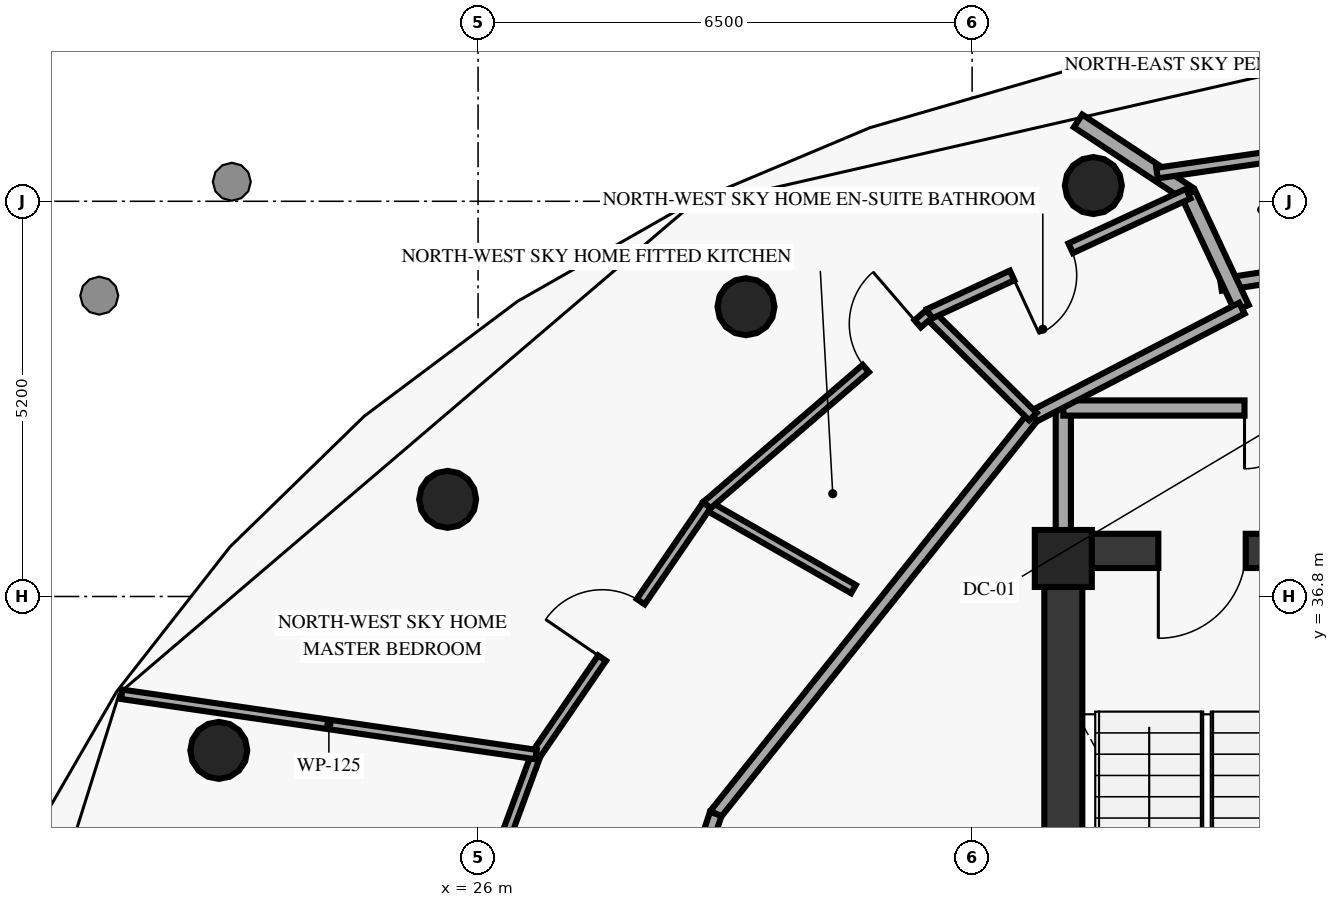
"""IFC4 building model, lengths in metres.
Left out: names, types, materials, properties, quantities, classifications, styles, units other than length and angle.
Written with IfcOpenShell. Run it as: python <this file> out.ifc"""

import sys

from ifc_helpers import new_model, si_unit, direction, frame, frame_2d, origin, origin_2d, place, context, subcontext, project, spatial, rectangle, circle, extrude, element, fill, save


model = new_model("IFC4")
c1 = context("Model", 3, precision=1e-05, world=origin(), true_north=direction((0.0, 1.0)))
c2 = subcontext(c1, "Body", "Model", "MODEL_VIEW")
j1 = project(units=[si_unit("LENGTHUNIT", "METRE"), si_unit("PLANEANGLEUNIT", "RADIAN")], contexts=[c1])
p1 = place(None, origin())
s1 = spatial("IfcSite", under=j1, at=p1, CompositionType="ELEMENT")
p2 = place(p1, origin())
s2 = spatial("IfcBuilding", under=s1, at=p2, CompositionType="ELEMENT")
p3 = place(p2, frame((0.0, 0.0, 255.6)))
s3 = spatial("IfcBuildingStorey", under=s2, at=p3, CompositionType="ELEMENT", Elevation=255.6)
p4 = place(p3, frame((33.7, 37.3, 0.0), z_axis=(0.0, 0.0, 1.0), x_axis=(1.0, 0.0, 0.0)))
e1 = element("IfcColumn", 1, at=p4, inside=s3, PredefinedType="PILASTER", context=c2, shape_type="SweptSolid", body=[
    extrude(rectangle(XDim=0.75, YDim=0.75, at=origin_2d()), origin(), (0.0, 0.0, 1.0), 3.54),
])
for number, where, z_axis, x_axis in (
    (2, (34.095, 42.207, 0.0), (0.0, 0.0, 1.0), (1.0, 0.0, 0.0)),
    (3, (29.525, 40.613, 0.0), (0.0, 0.0, 1.0), (1.0, 0.0, 0.0)),
    (4, (25.6, 38.078, 0.0), (0.0, 0.0, 1.0), (1.0, 0.0, 0.0)),
    (5, (22.589, 34.775, 0.0), (0.0, 0.0, 1.0), (1.0, 0.0, 0.0)),
):
    element("IfcColumn", number, at=place(p3, frame(where, z_axis=z_axis, x_axis=x_axis)), inside=s3, PredefinedType="COLUMN", context=c2, shape_type="SweptSolid", body=[
        extrude(circle(Radius=0.375, at=origin_2d()), origin(), (0.0, 0.0, 1.0), 3.54),
    ])
p5 = place(p3, frame((33.7, 29.05, 0.0), z_axis=(0.0, 0.0, 1.0), x_axis=(0.0, 1.0, 0.0)))
e6 = element("IfcWall", 6, at=p5, inside=s3, PredefinedType="SHEAR", context=c2, shape_type="SweptSolid", body=[
    extrude(rectangle(XDim=8.35, YDim=0.5, at=frame_2d((4.175, 0.0))), origin(), (0.0, 0.0, 1.0), 3.54),
])
p6 = place(p3, frame((37.35, 37.4, 0.0), z_axis=(0.0, 0.0, 1.0), x_axis=(-1.0, 0.0, 0.0)))
e7 = element("IfcWall", 7, at=p6, inside=s3, PredefinedType="SHEAR", context=c2, shape_type="SweptSolid", body=[
    extrude(rectangle(XDim=3.65, YDim=0.45, at=frame_2d((1.825, 0.0))), origin(), (0.0, 0.0, 1.0), 3.54),
])
p7 = place(p6, frame((1.25, 0.0, 0.0)))
e8 = element("IfcOpeningElement", 8, at=p7, cuts=e7, PredefinedType="OPENING", context=c2, shape_type="SweptSolid", body=[
    extrude(rectangle(XDim=1.15, YDim=2.15, at=frame_2d((0.575, 1.075))), frame((0.0, 0.235, 0.0), z_axis=(0.0, -1.0, 0.0), x_axis=(1.0, 0.0, 0.0)), (0.0, 0.0, 1.0), 0.47),
])
p8 = place(p3, frame((33.7, 37.4, 0.0), z_axis=(0.0, 0.0, 1.0), x_axis=(0.0, 1.0, 0.0)))
e9 = element("IfcWall", 9, at=p8, inside=s3, PredefinedType="SOLIDWALL", context=c2, shape_type="SweptSolid", body=[
    extrude(rectangle(XDim=1.88, YDim=0.2, at=frame_2d((0.94, 0.0))), origin(), (0.0, 0.0, 1.0), 3.54),
])
p9 = place(p3, frame((38.9, 39.28, 0.0), z_axis=(0.0, 0.0, 1.0), x_axis=(-1.0, 0.0, 0.0)))
e10 = element("IfcWall", 10, at=p9, inside=s3, PredefinedType="SOLIDWALL", context=c2, shape_type="SweptSolid", body=[
    extrude(rectangle(XDim=5.2, YDim=0.2, at=frame_2d((2.6, 0.0))), origin(), (0.0, 0.0, 1.0), 3.54),
])
p10 = place(p9, frame((1.216, 0.0, 0.0)))
e11 = element("IfcOpeningElement", 11, at=p10, cuts=e10, PredefinedType="OPENING", context=c2, shape_type="SweptSolid", body=[
    extrude(rectangle(XDim=1.6, YDim=2.2, at=frame_2d((0.8, 1.1))), frame((0.0, 0.11, 0.0), z_axis=(0.0, -1.0, 0.0), x_axis=(1.0, 0.0, 0.0)), (0.0, 0.0, 1.0), 0.22),
])
p11 = place(p3, frame((39.0, 41.4, 0.0), z_axis=(0.0, 0.0, 1.0), x_axis=(-0.988355267662, -0.152163940815, 0.0)))
e12 = element("IfcWall", 12, at=p11, inside=s3, PredefinedType="PARTITIONING", context=c2, shape_type="SweptSolid", body=[
    extrude(rectangle(XDim=3.265, YDim=0.16, at=frame_2d((1.633, 0.0))), origin(), (0.0, 0.0, 1.0), 3.54),
])
p12 = place(p3, frame((36.049, 40.593, 0.0), z_axis=(0.0, 0.0, 1.0), x_axis=(-0.424242188274, 0.905548764942, 0.0)))
e13 = element("IfcWall", 13, at=p12, inside=s3, PredefinedType="PARTITIONING", context=c2, shape_type="SweptSolid", body=[
    extrude(rectangle(XDim=1.664, YDim=0.2, at=frame_2d((0.832, 0.0))), origin(), (0.0, 0.0, 1.0), 3.54),
])
p13 = place(p3, frame((35.343, 42.1, 0.0), z_axis=(0.0, 0.0, 1.0), x_axis=(-0.834163281992, 0.551517559989, 0.0)))
e14 = element("IfcWall", 14, at=p13, inside=s3, PredefinedType="PARTITIONING", context=c2, shape_type="SweptSolid", body=[
    extrude(rectangle(XDim=1.737, YDim=0.2, at=frame_2d((0.869, 0.0))), origin(), (0.0, 0.0, 1.0), 3.54),
])
p14 = place(p3, frame((34.933, 42.371, 0.0), z_axis=(0.0, 0.0, 1.0), x_axis=(0.98967063222, 0.143359826038, 0.0)))
e15 = element("IfcWall", 15, at=p14, inside=s3, PredefinedType="PARTITIONING", context=c2, shape_type="SweptSolid", body=[
    extrude(rectangle(XDim=3.103, YDim=0.14, at=frame_2d((1.551, 0.0))), origin(), (0.0, 0.0, 1.0), 3.0),
])
p15 = place(p14, frame((1.762, 0.0, 0.0)))
e16 = element("IfcOpeningElement", 16, at=p15, cuts=e15, PredefinedType="OPENING", context=c2, shape_type="SweptSolid", body=[
    extrude(rectangle(XDim=0.85, YDim=2.1, at=frame_2d((0.425, 1.05))), frame((0.0, 0.08, 0.0), z_axis=(0.0, -1.0, 0.0), x_axis=(1.0, 0.0, 0.0)), (0.0, 0.0, 1.0), 0.16),
])
p16 = place(p3, frame((36.049, 40.593, 0.0), z_axis=(0.0, 0.0, 1.0), x_axis=(-0.887674575788, -0.460471331898, 0.0)))
e17 = element("IfcWall", 17, at=p16, inside=s3, PredefinedType="PARTITIONING", context=c2, shape_type="SweptSolid", body=[
    extrude(rectangle(XDim=3.097, YDim=0.16, at=frame_2d((1.548, 0.0))), origin(), (0.0, 0.0, 1.0), 3.54),
])
p17 = place(p3, frame((33.3, 39.167, 0.0), z_axis=(0.0, 0.0, 1.0), x_axis=(-0.623915746766, -0.781491612839, 0.0)))
e18 = element("IfcWall", 18, at=p17, inside=s3, PredefinedType="PARTITIONING", context=c2, shape_type="SweptSolid", body=[
    extrude(rectangle(XDim=6.688, YDim=0.16, at=frame_2d((3.344, 0.0))), origin(), (0.0, 0.0, 1.0), 3.54),
])
p18 = place(p3, frame((29.127, 33.94, 0.0), z_axis=(0.0, 0.0, 1.0), x_axis=(-0.313985571683, -0.949427754374, 0.0)))
e19 = element("IfcWall", 19, at=p18, inside=s3, PredefinedType="PARTITIONING", context=c2, shape_type="SweptSolid", body=[
    extrude(rectangle(XDim=3.627, YDim=0.16, at=frame_2d((1.813, 0.0))), origin(), (0.0, 0.0, 1.0), 3.54),
])
p19 = place(p3, frame((33.3, 39.167, 0.0), z_axis=(0.0, 0.0, 1.0), x_axis=(-0.710720381731, 0.703474618584, 0.0)))
e20 = element("IfcWall", 20, at=p19, inside=s3, PredefinedType="PARTITIONING", context=c2, shape_type="SweptSolid", body=[
    extrude(rectangle(XDim=1.921, YDim=0.14, at=frame_2d((0.96, 0.0))), origin(), (0.0, 0.0, 1.0), 3.54),
])
p20 = place(p3, frame((30.939, 36.897, 0.0), z_axis=(0.0, 0.0, 1.0), x_axis=(-0.868013301924, 0.496540942606, 0.0)))
e21 = element("IfcWall", 21, at=p20, inside=s3, PredefinedType="PARTITIONING", context=c2, shape_type="SweptSolid", body=[
    extrude(rectangle(XDim=2.223, YDim=0.125, at=frame_2d((1.112, 0.0))), origin(), (0.0, 0.0, 1.0), 3.54),
])
p21 = place(p3, frame((31.935, 40.518, 0.0), z_axis=(0.0, 0.0, 1.0), x_axis=(0.907032898502, 0.421059759459, 0.0)))
e22 = element("IfcWall", 22, at=p21, inside=s3, PredefinedType="PARTITIONING", context=c2, shape_type="SweptSolid", body=[
    extrude(rectangle(XDim=3.757, YDim=0.14, at=frame_2d((1.879, 0.0))), origin(), (0.0, 0.0, 1.0), 3.54),
])
p22 = place(p21, frame((1.203, 0.0, 0.0)))
e23 = element("IfcOpeningElement", 23, at=p22, cuts=e22, PredefinedType="OPENING", context=c2, shape_type="SweptSolid", body=[
    extrude(rectangle(XDim=0.85, YDim=2.1, at=frame_2d((0.425, 1.05))), frame((0.0, 0.08, 0.0), z_axis=(0.0, -1.0, 0.0), x_axis=(1.0, 0.0, 0.0)), (0.0, 0.0, 1.0), 0.16),
])
p23 = place(p3, frame((29.009, 38.001, 0.0), z_axis=(0.0, 0.0, 1.0), x_axis=(0.758094504626, 0.652144709444, 0.0)))
e24 = element("IfcWall", 24, at=p23, inside=s3, PredefinedType="PARTITIONING", context=c2, shape_type="SweptSolid", body=[
    extrude(rectangle(XDim=3.86, YDim=0.125, at=frame_2d((1.93, 0.0))), origin(), (0.0, 0.0, 1.0), 3.54),
])
p24 = place(p23, frame((2.76, 0.0, 0.0)))
e25 = element("IfcOpeningElement", 25, at=p24, cuts=e24, PredefinedType="OPENING", context=c2, shape_type="SweptSolid", body=[
    extrude(rectangle(XDim=0.9, YDim=2.1, at=frame_2d((0.45, 1.05))), frame((0.0, 0.073, 0.0), z_axis=(0.0, -1.0, 0.0), x_axis=(1.0, 0.0, 0.0)), (0.0, 0.0, 1.0), 0.145),
])
p25 = place(p3, frame((26.763, 34.72, 0.0), z_axis=(0.0, 0.0, 1.0), x_axis=(0.564888606623, 0.825167172219, 0.0)))
e26 = element("IfcWall", 26, at=p25, inside=s3, PredefinedType="PARTITIONING", context=c2, shape_type="SweptSolid", body=[
    extrude(rectangle(XDim=3.976, YDim=0.125, at=frame_2d((1.988, 0.0))), origin(), (0.0, 0.0, 1.0), 3.54),
])
p26 = place(p25, frame((1.538, 0.0, 0.0)))
e27 = element("IfcOpeningElement", 27, at=p26, cuts=e26, PredefinedType="OPENING", context=c2, shape_type="SweptSolid", body=[
    extrude(rectangle(XDim=0.9, YDim=2.1, at=frame_2d((0.45, 1.05))), frame((0.0, 0.073, 0.0), z_axis=(0.0, -1.0, 0.0), x_axis=(1.0, 0.0, 0.0)), (0.0, 0.0, 1.0), 0.145),
])
p27 = place(p3, frame((25.351, 30.9, 0.0), z_axis=(0.0, 0.0, 1.0), x_axis=(0.346671925992, 0.937986447519, 0.0)))
e28 = element("IfcWall", 28, at=p27, inside=s3, PredefinedType="PARTITIONING", context=c2, shape_type="SweptSolid", body=[
    extrude(rectangle(XDim=4.073, YDim=0.125, at=frame_2d((2.036, 0.0))), origin(), (0.0, 0.0, 1.0), 3.54),
])
p28 = place(p27, frame((1.586, 0.0, 0.0)))
e29 = element("IfcOpeningElement", 29, at=p28, cuts=e28, PredefinedType="OPENING", context=c2, shape_type="SweptSolid", body=[
    extrude(rectangle(XDim=0.9, YDim=2.1, at=frame_2d((0.45, 1.05))), frame((0.0, 0.073, 0.0), z_axis=(0.0, -1.0, 0.0), x_axis=(1.0, 0.0, 0.0)), (0.0, 0.0, 1.0), 0.145),
])
p29 = place(p3, frame((26.763, 34.72, 0.0), z_axis=(0.0, 0.0, 1.0), x_axis=(-0.989587357403, 0.143933533511, 0.0)))
e30 = element("IfcWall", 30, at=p29, inside=s3, PredefinedType="PARTITIONING", context=c2, shape_type="SweptSolid", body=[
    extrude(rectangle(XDim=5.509, YDim=0.125, at=frame_2d((2.755, 0.0))), origin(), (0.0, 0.0, 1.0), 3.54),
])
p30 = place(p7, origin())
e31 = element("IfcDoor", 31, at=p30, inside=s3, OperationType="SINGLE_SWING_RIGHT", PredefinedType="DOOR", context=c2, shape_type="SweptSolid", body=[
    extrude(rectangle(XDim=1.15, YDim=2.15, at=frame_2d((0.575, 1.075))), frame((0.0, 0.025, 0.0), z_axis=(0.0, -1.0, 0.0), x_axis=(1.0, 0.0, 0.0)), (0.0, 0.0, 1.0), 0.05),
])
fill(e8, e31)
p31 = place(p10, origin())
e32 = element("IfcDoor", 32, at=p31, inside=s3, OperationType="DOUBLE_DOOR_SINGLE_SWING", PredefinedType="DOOR", context=c2, shape_type="SweptSolid", body=[
    extrude(rectangle(XDim=1.6, YDim=2.2, at=frame_2d((0.8, 1.1))), frame((0.0, 0.025, 0.0), z_axis=(0.0, -1.0, 0.0), x_axis=(1.0, 0.0, 0.0)), (0.0, 0.0, 1.0), 0.05),
])
fill(e11, e32)
p32 = place(p22, origin())
e33 = element("IfcDoor", 33, at=p32, inside=s3, OperationType="SINGLE_SWING_LEFT", PredefinedType="DOOR", context=c2, shape_type="SweptSolid", body=[
    extrude(rectangle(XDim=0.85, YDim=2.1, at=frame_2d((0.425, 1.05))), frame((0.0, 0.025, 0.0), z_axis=(0.0, -1.0, 0.0), x_axis=(1.0, 0.0, 0.0)), (0.0, 0.0, 1.0), 0.05),
])
fill(e23, e33)
p33 = place(p24, origin())
e34 = element("IfcDoor", 34, at=p33, inside=s3, OperationType="SINGLE_SWING_RIGHT", PredefinedType="DOOR", context=c2, shape_type="SweptSolid", body=[
    extrude(rectangle(XDim=0.9, YDim=2.1, at=frame_2d((0.45, 1.05))), frame((0.0, 0.025, 0.0), z_axis=(0.0, -1.0, 0.0), x_axis=(1.0, 0.0, 0.0)), (0.0, 0.0, 1.0), 0.05),
])
fill(e25, e34)
p34 = place(p26, origin())
e35 = element("IfcDoor", 35, at=p34, inside=s3, OperationType="SINGLE_SWING_LEFT", PredefinedType="DOOR", context=c2, shape_type="SweptSolid", body=[
    extrude(rectangle(XDim=0.9, YDim=2.1, at=frame_2d((0.45, 1.05))), frame((0.0, 0.025, 0.0), z_axis=(0.0, -1.0, 0.0), x_axis=(1.0, 0.0, 0.0)), (0.0, 0.0, 1.0), 0.05),
])
fill(e27, e35)
save(model, sys.argv[1])
